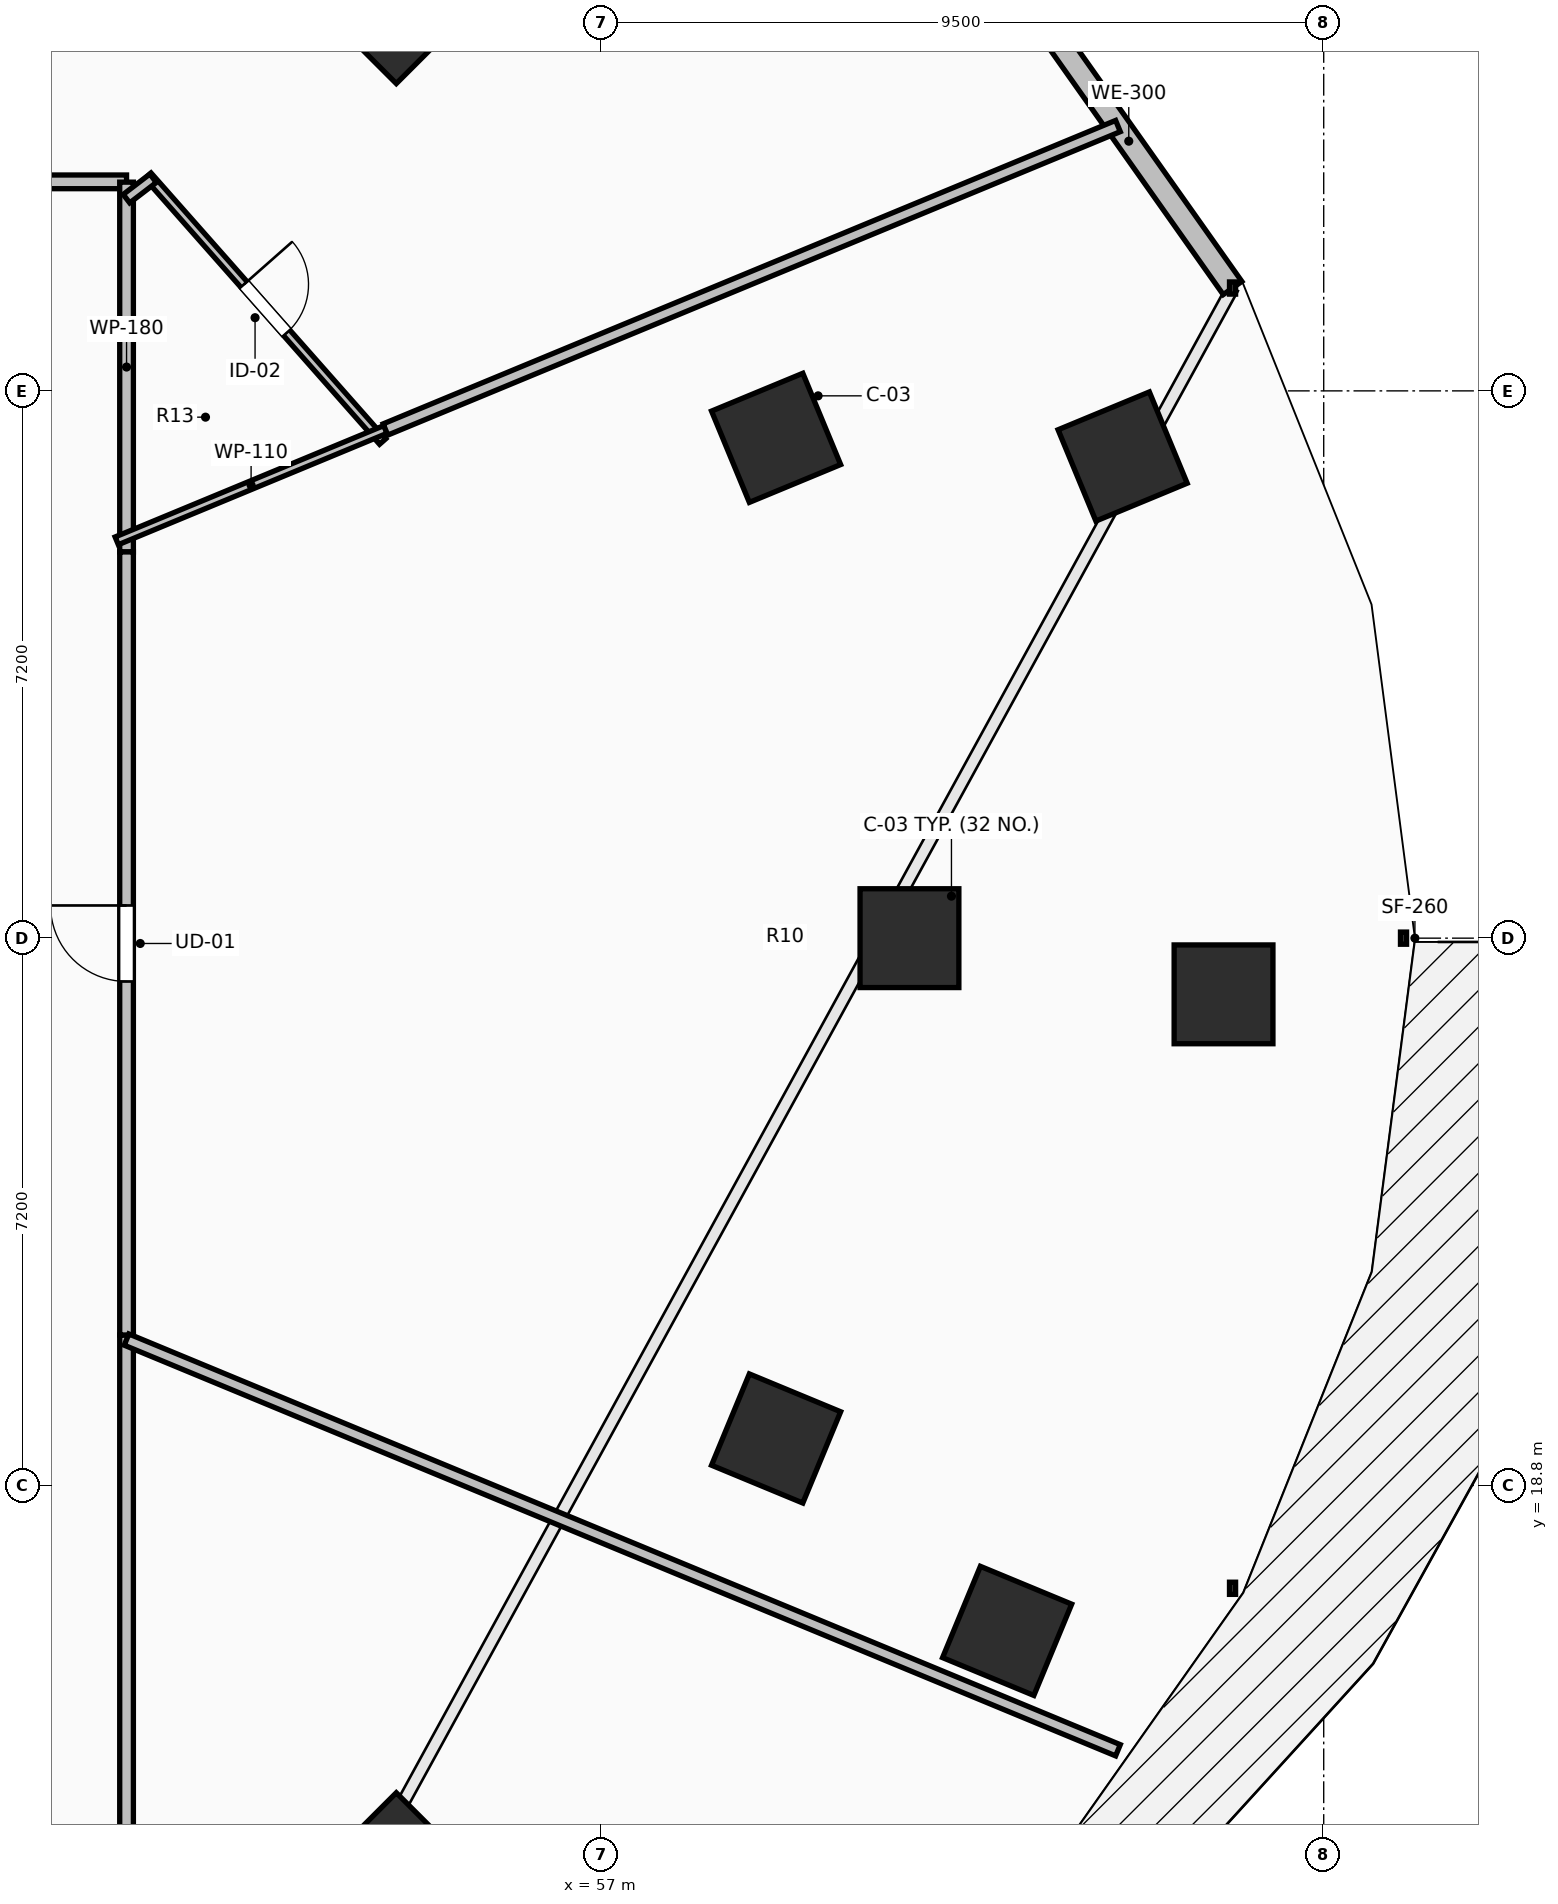
"""IFC4 building model, lengths in metres.
Left out: names, types, materials, properties, quantities, classifications, styles, units other than length and angle.
Written with IfcOpenShell. Run it as: python <this file> out.ifc"""

import sys

from ifc_helpers import new_model, si_unit, direction, frame, frame_2d, origin, origin_2d, place, context, subcontext, project, spatial, rectangle, extrude, element, fill, save


model = new_model("IFC4")
c1 = context("Model", 3, precision=1e-05, world=origin(), true_north=direction((0.0, 1.0)))
c2 = subcontext(c1, "Body", "Model", "MODEL_VIEW")
j1 = project(units=[si_unit("LENGTHUNIT", "METRE"), si_unit("PLANEANGLEUNIT", "RADIAN")], contexts=[c1])
p1 = place(None, origin())
s1 = spatial("IfcSite", under=j1, at=p1, CompositionType="ELEMENT")
p2 = place(p1, origin())
s2 = spatial("IfcBuilding", under=s1, at=p2, CompositionType="ELEMENT")
p3 = place(p2, frame((0.0, 0.0, 45.0)))
s3 = spatial("IfcBuildingStorey", under=s2, at=p3, CompositionType="ELEMENT", Elevation=45.0)
for number, where, z_axis, x_axis in (
    (1, (61.05, 26.0, 0.0), (0.0, 0.0, 1.0), (1.0, 0.0, 0.0)),
    (2, (59.295, 32.582, 0.0), (0.0, 0.0, 1.0), (0.924, 0.383, 0.0)),
    (3, (54.299, 38.162, 0.0), (0.0, 0.0, 1.0), (0.707, 0.707, 0.0)),
    (4, (54.299, 13.838, 0.0), (0.0, 0.0, 1.0), (0.707, -0.707, 0.0)),
    (5, (59.295, 19.418, 0.0), (0.0, 0.0, 1.0), (0.924, -0.383, 0.0)),
    (6, (65.182, 25.261, 0.0), (0.0, 0.0, 1.0), (1.0, 0.0, 0.0)),
    (7, (63.854, 32.337, 0.0), (0.0, 0.0, 1.0), (0.924, 0.383, 0.0)),
    (8, (62.335, 16.886, 0.0), (0.0, 0.0, 1.0), (0.924, -0.383, 0.0)),
):
    element("IfcColumn", number, at=place(p3, frame(where, z_axis=z_axis, x_axis=x_axis)), inside=s3, PredefinedType="COLUMN", context=c2, shape_type="SweptSolid", body=[
        extrude(rectangle(XDim=1.3, YDim=1.3, at=origin_2d()), origin(), (0.0, 0.0, 1.0), 3.5),
    ])
p4 = place(p3, frame((65.301, 34.553, 0.0), z_axis=(0.0, 0.0, 1.0), x_axis=(-0.577130815624, 0.816651713803, 0.0)))
e9 = element("IfcWall", 9, at=p4, inside=s3, PredefinedType="STANDARD", context=c2, shape_type="SweptSolid", body=[
    extrude(rectangle(XDim=4.731, YDim=0.3, at=frame_2d((2.366, 0.0))), origin(), (0.0, 0.0, 1.0), 3.24),
])
p5 = place(p3, frame((50.75, 35.95, 0.0), z_axis=(0.0, 0.0, 1.0), x_axis=(-1.0, 0.0, 0.0)))
e10 = element("IfcWall", 10, at=p5, inside=s3, PredefinedType="PARTITIONING", context=c2, shape_type="SweptSolid", body=[
    extrude(rectangle(XDim=6.162, YDim=0.18, at=frame_2d((3.081, 0.0))), origin(), (0.0, 0.0, 1.0), 2.432),
])
p6 = place(p5, frame((2.556, 0.0, 0.0)))
e11 = element("IfcOpeningElement", 11, at=p6, cuts=e10, PredefinedType="OPENING", context=c2, shape_type="SweptSolid", body=[
    extrude(rectangle(XDim=1.05, YDim=2.2, at=frame_2d((0.525, 1.1))), frame((0.0, 0.105, 0.0), z_axis=(0.0, -1.0, 0.0), x_axis=(1.0, 0.0, 0.0)), (0.0, 0.0, 1.0), 0.21),
])
p7 = place(p3, frame((50.75, 31.081, 0.0), z_axis=(0.0, 0.0, 1.0), x_axis=(0.0, 1.0, 0.0)))
e12 = element("IfcWall", 12, at=p7, inside=s3, PredefinedType="PARTITIONING", context=c2, shape_type="SweptSolid", body=[
    extrude(rectangle(XDim=4.865, YDim=0.18, at=frame_2d((2.433, 0.0))), origin(), (0.0, 0.0, 1.0), 2.432),
])
p8 = place(p3, frame((50.75, 14.1, 0.0), z_axis=(0.0, 0.0, 1.0), x_axis=(0.0, 1.0, 0.0)))
e13 = element("IfcWall", 13, at=p8, inside=s3, PredefinedType="PARTITIONING", context=c2, shape_type="SweptSolid", body=[
    extrude(rectangle(XDim=6.679, YDim=0.18, at=frame_2d((3.339, 0.0))), origin(), (0.0, 0.0, 1.0), 2.432),
])
p9 = place(p3, frame((50.75, 20.779, 0.0), z_axis=(0.0, 0.0, 1.0), x_axis=(0.0, 1.0, 0.0)))
e14 = element("IfcWall", 14, at=p9, inside=s3, PredefinedType="PARTITIONING", context=c2, shape_type="SweptSolid", body=[
    extrude(rectangle(XDim=10.302, YDim=0.18, at=frame_2d((5.151, 0.0))), origin(), (0.0, 0.0, 1.0), 2.432),
])
p10 = place(p9, frame((4.651, 0.0, 0.0)))
e15 = element("IfcOpeningElement", 15, at=p10, cuts=e14, PredefinedType="OPENING", context=c2, shape_type="SweptSolid", body=[
    extrude(rectangle(XDim=1.0, YDim=2.15, at=frame_2d((0.5, 1.075))), frame((0.0, 0.105, 0.0), z_axis=(0.0, -1.0, 0.0), x_axis=(1.0, 0.0, 0.0)), (0.0, 0.0, 1.0), 0.21),
])
p11 = place(p3, frame((51.031, 36.03, 0.0), z_axis=(0.0, 0.0, 1.0), x_axis=(0.662106207726, -0.749410014405, 0.0)))
e16 = element("IfcWall", 16, at=p11, inside=s3, PredefinedType="PARTITIONING", context=c2, shape_type="SweptSolid", body=[
    extrude(rectangle(XDim=4.665, YDim=0.11, at=frame_2d((2.332, 0.0))), origin(), (0.0, 0.0, 1.0), 2.432),
])
p12 = place(p11, frame((1.907, 0.0, 0.0)))
e17 = element("IfcOpeningElement", 17, at=p12, cuts=e16, PredefinedType="OPENING", context=c2, shape_type="SweptSolid", body=[
    extrude(rectangle(XDim=0.85, YDim=2.1, at=frame_2d((0.425, 1.05))), frame((0.0, 0.07, 0.0), z_axis=(0.0, -1.0, 0.0), x_axis=(1.0, 0.0, 0.0)), (0.0, 0.0, 1.0), 0.14),
])
p13 = place(p3, frame((54.156, 32.693, 0.0), z_axis=(0.0, 0.0, 1.0), x_axis=(-0.923803754276, -0.382866326002, 0.0)))
e18 = element("IfcWall", 18, at=p13, inside=s3, PredefinedType="PARTITIONING", context=c2, shape_type="SweptSolid", body=[
    extrude(rectangle(XDim=3.827, YDim=0.11, at=frame_2d((1.914, 0.0))), origin(), (0.0, 0.0, 1.0), 2.432),
])
p14 = place(p3, frame((51.267, 45.856, 0.0), z_axis=(0.0, 0.0, 1.0), x_axis=(-0.55557946655, -0.831463442581, 0.0)))
e19 = element("IfcWall", 19, at=p14, inside=s3, PredefinedType="PARTITIONING", context=c2, shape_type="SweptSolid", body=[
    extrude(rectangle(XDim=11.914, YDim=0.16, at=frame_2d((5.957, 0.0))), origin(), (0.0, 0.0, 1.0), 2.432),
])
p15 = place(p3, frame((54.156, 32.692, 0.0), z_axis=(0.0, 0.0, 1.0), x_axis=(0.923866486063, 0.38271492776, 0.0)))
e20 = element("IfcWall", 20, at=p15, inside=s3, PredefinedType="PARTITIONING", context=c2, shape_type="SweptSolid", body=[
    extrude(rectangle(XDim=10.431, YDim=0.16, at=frame_2d((5.215, 0.0))), origin(), (0.0, 0.0, 1.0), 2.432),
])
p16 = place(p3, frame((63.793, 15.316, 0.0), z_axis=(0.0, 0.0, 1.0), x_axis=(-0.923866969846, 0.382713759914, 0.0)))
e21 = element("IfcWall", 21, at=p16, inside=s3, PredefinedType="PARTITIONING", context=c2, shape_type="SweptSolid", body=[
    extrude(rectangle(XDim=14.118, YDim=0.16, at=frame_2d((7.059, 0.0))), origin(), (0.0, 0.0, 1.0), 2.624),
])
p17 = place(p3, frame((51.099, 35.997, 0.0), z_axis=(0.0, 0.0, 1.0), x_axis=(-0.794185002189, -0.607676050456, 0.0)))
e22 = element("IfcWall", 22, at=p17, inside=s3, PredefinedType="PARTITIONING", context=c2, shape_type="SweptSolid", body=[
    extrude(rectangle(XDim=0.441, YDim=0.14, at=frame_2d((0.221, 0.0))), origin(), (0.0, 0.0, 1.0), 2.886),
])
p18 = place(p10, origin())
e23 = element("IfcDoor", 23, at=p18, inside=s3, OperationType="SINGLE_SWING_RIGHT", PredefinedType="DOOR", context=c2, shape_type="SweptSolid", body=[
    extrude(rectangle(XDim=1.0, YDim=2.15, at=frame_2d((0.5, 1.075))), frame((0.0, 0.025, 0.0), z_axis=(0.0, -1.0, 0.0), x_axis=(1.0, 0.0, 0.0)), (0.0, 0.0, 1.0), 0.05),
])
fill(e15, e23)
p19 = place(p12, origin())
e24 = element("IfcDoor", 24, at=p19, inside=s3, OperationType="SINGLE_SWING_LEFT", PredefinedType="DOOR", context=c2, shape_type="SweptSolid", body=[
    extrude(rectangle(XDim=0.85, YDim=2.1, at=frame_2d((0.425, 1.05))), frame((0.0, 0.025, 0.0), z_axis=(0.0, -1.0, 0.0), x_axis=(1.0, 0.0, 0.0)), (0.0, 0.0, 1.0), 0.05),
])
fill(e17, e24)
save(model, sys.argv[1])
